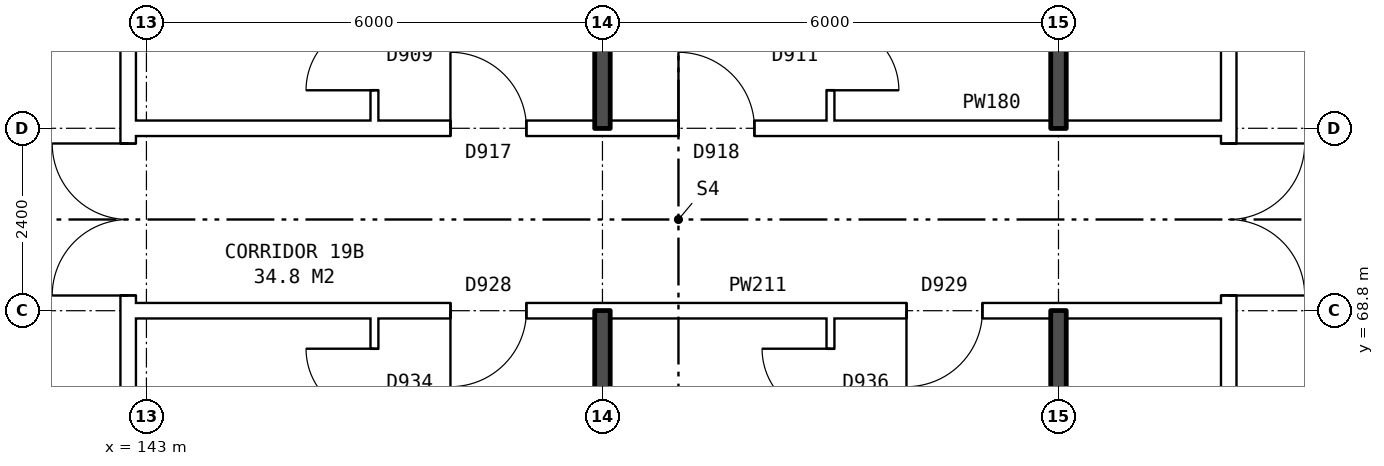
"""IFC4 building model, lengths in metres.
Left out: names, types, materials, properties, quantities, classifications, styles, units other than length and angle.
Written with IfcOpenShell. Run it as: python <this file> out.ifc"""

import sys

from ifc_helpers import new_model, si_unit, direction, frame, frame_2d, origin, place, context, subcontext, project, spatial, rectangle, extrude, element, fill, save


model = new_model("IFC4")
c1 = context("Model", 3, precision=1e-05, world=origin(), true_north=direction((0.0, 1.0)))
c2 = subcontext(c1, "Body", "Model", "MODEL_VIEW")
j1 = project(units=[si_unit("LENGTHUNIT", "METRE"), si_unit("PLANEANGLEUNIT", "RADIAN")], contexts=[c1])
p1 = place(None, origin())
s1 = spatial("IfcSite", under=j1, at=p1, CompositionType="ELEMENT")
p2 = place(p1, origin())
s2 = spatial("IfcBuilding", under=s1, at=p2, CompositionType="ELEMENT")
p3 = place(p2, frame((0.0, 0.0, 71.6)))
s3 = spatial("IfcBuildingStorey", under=s2, at=p3, CompositionType="ELEMENT", Elevation=71.6)
p4 = place(p3, frame((142.76, 63.9, 0.0), z_axis=(0.0, 0.0, 1.0), x_axis=(0.0, 1.0, 0.0)))
e1 = element("IfcWall", 1, at=p4, inside=s3, PredefinedType="PARTITIONING", context=c2, shape_type="SweptSolid", body=[
    extrude(rectangle(XDim=12.2, YDim=0.2, at=frame_2d((6.1, 0.0))), origin(), (0.0, 0.0, 1.0), 2.85),
])
p5 = place(p4, frame((5.1, 0.0, 0.0)))
e2 = element("IfcOpeningElement", 2, at=p5, cuts=e1, PredefinedType="OPENING", context=c2, shape_type="SweptSolid", body=[
    extrude(rectangle(XDim=2.0, YDim=2.1, at=frame_2d((1.0, 1.05))), frame((0.0, 0.11, 0.0), z_axis=(0.0, -1.0, 0.0), x_axis=(1.0, 0.0, 0.0)), (0.0, 0.0, 1.0), 0.22),
])
p6 = place(p3, frame((157.24, 63.9, 0.0), z_axis=(0.0, 0.0, 1.0), x_axis=(0.0, 1.0, 0.0)))
e3 = element("IfcWall", 3, at=p6, inside=s3, PredefinedType="PARTITIONING", context=c2, shape_type="SweptSolid", body=[
    extrude(rectangle(XDim=12.2, YDim=0.2, at=frame_2d((6.1, 0.0))), origin(), (0.0, 0.0, 1.0), 2.85),
])
p7 = place(p6, frame((5.1, 0.0, 0.0)))
e4 = element("IfcOpeningElement", 4, at=p7, cuts=e3, PredefinedType="OPENING", context=c2, shape_type="SweptSolid", body=[
    extrude(rectangle(XDim=2.0, YDim=2.1, at=frame_2d((1.0, 1.05))), frame((0.0, 0.11, 0.0), z_axis=(0.0, -1.0, 0.0), x_axis=(1.0, 0.0, 0.0)), (0.0, 0.0, 1.0), 0.22),
])
p8 = place(p3, frame((142.76, 68.8, 0.0), z_axis=(0.0, 0.0, 1.0), x_axis=(1.0, 0.0, 0.0)))
e5 = element("IfcWall", 5, at=p8, inside=s3, PredefinedType="PARTITIONING", context=c2, shape_type="SweptSolid", body=[
    extrude(rectangle(XDim=14.48, YDim=0.2, at=frame_2d((7.24, 0.0))), origin(), (0.0, 0.0, 1.0), 2.85),
])
p9 = place(p8, frame((4.24, 0.0, 0.0)))
e6 = element("IfcOpeningElement", 6, at=p9, cuts=e5, PredefinedType="OPENING", context=c2, shape_type="SweptSolid", body=[
    extrude(rectangle(XDim=1.0, YDim=2.1, at=frame_2d((0.5, 1.05))), frame((0.0, 0.11, 0.0), z_axis=(0.0, -1.0, 0.0), x_axis=(1.0, 0.0, 0.0)), (0.0, 0.0, 1.0), 0.22),
])
p10 = place(p8, frame((10.24, 0.0, 0.0)))
e7 = element("IfcOpeningElement", 7, at=p10, cuts=e5, PredefinedType="OPENING", context=c2, shape_type="SweptSolid", body=[
    extrude(rectangle(XDim=1.0, YDim=2.1, at=frame_2d((0.5, 1.05))), frame((0.0, 0.11, 0.0), z_axis=(0.0, -1.0, 0.0), x_axis=(1.0, 0.0, 0.0)), (0.0, 0.0, 1.0), 0.22),
])
p11 = place(p3, frame((142.76, 71.2, 0.0), z_axis=(0.0, 0.0, 1.0), x_axis=(1.0, 0.0, 0.0)))
e8 = element("IfcWall", 8, at=p11, inside=s3, PredefinedType="PARTITIONING", context=c2, shape_type="SweptSolid", body=[
    extrude(rectangle(XDim=14.48, YDim=0.2, at=frame_2d((7.24, 0.0))), origin(), (0.0, 0.0, 1.0), 2.85),
])
p12 = place(p11, frame((4.24, 0.0, 0.0)))
e9 = element("IfcOpeningElement", 9, at=p12, cuts=e8, PredefinedType="OPENING", context=c2, shape_type="SweptSolid", body=[
    extrude(rectangle(XDim=1.0, YDim=2.1, at=frame_2d((0.5, 1.05))), frame((0.0, 0.11, 0.0), z_axis=(0.0, -1.0, 0.0), x_axis=(1.0, 0.0, 0.0)), (0.0, 0.0, 1.0), 0.22),
])
p13 = place(p11, frame((7.24, 0.0, 0.0)))
e10 = element("IfcOpeningElement", 10, at=p13, cuts=e8, PredefinedType="OPENING", context=c2, shape_type="SweptSolid", body=[
    extrude(rectangle(XDim=1.0, YDim=2.1, at=frame_2d((0.5, 1.05))), frame((0.0, 0.11, 0.0), z_axis=(0.0, -1.0, 0.0), x_axis=(1.0, 0.0, 0.0)), (0.0, 0.0, 1.0), 0.22),
])
p14 = place(p3, frame((146.0, 54.36, 0.0), z_axis=(0.0, 0.0, 1.0), x_axis=(0.0, 1.0, 0.0)))
e11 = element("IfcWall", 11, at=p14, inside=s3, PredefinedType="PARTITIONING", context=c2, shape_type="SweptSolid", body=[
    extrude(rectangle(XDim=14.34, YDim=0.1, at=frame_2d((7.17, 0.0))), origin(), (0.0, 0.0, 1.0), 2.85),
])
p15 = place(p14, frame((4.2, 0.0, 0.0)))
e12 = element("IfcOpeningElement", 12, at=p15, cuts=e11, PredefinedType="OPENING", context=c2, shape_type="SweptSolid", body=[
    extrude(rectangle(XDim=0.9, YDim=2.1, at=frame_2d((0.45, 1.05))), frame((0.0, 0.06, 0.0), z_axis=(0.0, -1.0, 0.0), x_axis=(1.0, 0.0, 0.0)), (0.0, 0.0, 1.0), 0.12),
])
p16 = place(p14, frame((13.04, 0.0, 0.0)))
e13 = element("IfcOpeningElement", 13, at=p16, cuts=e11, PredefinedType="OPENING", context=c2, shape_type="SweptSolid", body=[
    extrude(rectangle(XDim=0.9, YDim=2.1, at=frame_2d((0.45, 1.05))), frame((0.0, 0.06, 0.0), z_axis=(0.0, -1.0, 0.0), x_axis=(1.0, 0.0, 0.0)), (0.0, 0.0, 1.0), 0.12),
])
p17 = place(p3, frame((146.0, 71.3, 0.0), z_axis=(0.0, 0.0, 1.0), x_axis=(0.0, 1.0, 0.0)))
e14 = element("IfcWall", 14, at=p17, inside=s3, PredefinedType="PARTITIONING", context=c2, shape_type="SweptSolid", body=[
    extrude(rectangle(XDim=14.34, YDim=0.1, at=frame_2d((7.17, 0.0))), origin(), (0.0, 0.0, 1.0), 2.85),
])
p18 = place(p17, frame((9.24, 0.0, 0.0)))
e15 = element("IfcOpeningElement", 15, at=p18, cuts=e14, PredefinedType="OPENING", context=c2, shape_type="SweptSolid", body=[
    extrude(rectangle(XDim=0.9, YDim=2.1, at=frame_2d((0.45, 1.05))), frame((0.0, 0.06, 0.0), z_axis=(0.0, -1.0, 0.0), x_axis=(1.0, 0.0, 0.0)), (0.0, 0.0, 1.0), 0.12),
])
p19 = place(p17, frame((0.4, 0.0, 0.0)))
e16 = element("IfcOpeningElement", 16, at=p19, cuts=e14, PredefinedType="OPENING", context=c2, shape_type="SweptSolid", body=[
    extrude(rectangle(XDim=0.9, YDim=2.1, at=frame_2d((0.45, 1.05))), frame((0.0, 0.06, 0.0), z_axis=(0.0, -1.0, 0.0), x_axis=(1.0, 0.0, 0.0)), (0.0, 0.0, 1.0), 0.12),
])
for number, where, z_axis, x_axis in (
    (17, (149.0, 54.36, 0.0), (0.0, 0.0, 1.0), (0.0, 1.0, 0.0)),
    (18, (149.0, 71.2, 0.0), (0.0, 0.0, 1.0), (0.0, 1.0, 0.0)),
):
    element("IfcWall", number, at=place(p3, frame(where, z_axis=z_axis, x_axis=x_axis)), inside=s3, PredefinedType="SOLIDWALL", context=c2, shape_type="SweptSolid", body=[
        extrude(rectangle(XDim=14.44, YDim=0.2, at=frame_2d((7.22, 0.0))), origin(), (0.0, 0.0, 1.0), 2.85),
    ])
p20 = place(p3, frame((152.0, 54.36, 0.0), z_axis=(0.0, 0.0, 1.0), x_axis=(0.0, 1.0, 0.0)))
e19 = element("IfcWall", 19, at=p20, inside=s3, PredefinedType="PARTITIONING", context=c2, shape_type="SweptSolid", body=[
    extrude(rectangle(XDim=14.34, YDim=0.1, at=frame_2d((7.17, 0.0))), origin(), (0.0, 0.0, 1.0), 2.85),
])
p21 = place(p20, frame((4.2, 0.0, 0.0)))
e20 = element("IfcOpeningElement", 20, at=p21, cuts=e19, PredefinedType="OPENING", context=c2, shape_type="SweptSolid", body=[
    extrude(rectangle(XDim=0.9, YDim=2.1, at=frame_2d((0.45, 1.05))), frame((0.0, 0.06, 0.0), z_axis=(0.0, -1.0, 0.0), x_axis=(1.0, 0.0, 0.0)), (0.0, 0.0, 1.0), 0.12),
])
p22 = place(p20, frame((13.04, 0.0, 0.0)))
e21 = element("IfcOpeningElement", 21, at=p22, cuts=e19, PredefinedType="OPENING", context=c2, shape_type="SweptSolid", body=[
    extrude(rectangle(XDim=0.9, YDim=2.1, at=frame_2d((0.45, 1.05))), frame((0.0, 0.06, 0.0), z_axis=(0.0, -1.0, 0.0), x_axis=(1.0, 0.0, 0.0)), (0.0, 0.0, 1.0), 0.12),
])
p23 = place(p3, frame((152.0, 71.3, 0.0), z_axis=(0.0, 0.0, 1.0), x_axis=(0.0, 1.0, 0.0)))
e22 = element("IfcWall", 22, at=p23, inside=s3, PredefinedType="PARTITIONING", context=c2, shape_type="SweptSolid", body=[
    extrude(rectangle(XDim=14.34, YDim=0.1, at=frame_2d((7.17, 0.0))), origin(), (0.0, 0.0, 1.0), 2.85),
])
p24 = place(p23, frame((7.94, 0.0, 0.0)))
e23 = element("IfcOpeningElement", 23, at=p24, cuts=e22, PredefinedType="OPENING", context=c2, shape_type="SweptSolid", body=[
    extrude(rectangle(XDim=0.9, YDim=2.1, at=frame_2d((0.45, 1.05))), frame((0.0, 0.06, 0.0), z_axis=(0.0, -1.0, 0.0), x_axis=(1.0, 0.0, 0.0)), (0.0, 0.0, 1.0), 0.12),
])
p25 = place(p23, frame((0.4, 0.0, 0.0)))
e24 = element("IfcOpeningElement", 24, at=p25, cuts=e22, PredefinedType="OPENING", context=c2, shape_type="SweptSolid", body=[
    extrude(rectangle(XDim=0.9, YDim=2.1, at=frame_2d((0.45, 1.05))), frame((0.0, 0.06, 0.0), z_axis=(0.0, -1.0, 0.0), x_axis=(1.0, 0.0, 0.0)), (0.0, 0.0, 1.0), 0.12),
])
for number, where, z_axis, x_axis in (
    (25, (155.0, 63.8, 0.0), (0.0, 0.0, 1.0), (0.0, 1.0, 0.0)),
    (26, (155.0, 71.2, 0.0), (0.0, 0.0, 1.0), (0.0, 1.0, 0.0)),
):
    element("IfcWall", number, at=place(p3, frame(where, z_axis=z_axis, x_axis=x_axis)), inside=s3, PredefinedType="SOLIDWALL", context=c2, shape_type="SweptSolid", body=[
        extrude(rectangle(XDim=5.0, YDim=0.2, at=frame_2d((2.5, 0.0))), origin(), (0.0, 0.0, 1.0), 2.85),
    ])
p26 = place(p5, origin())
e27 = element("IfcDoor", 27, at=p26, inside=s3, OperationType="DOUBLE_DOOR_SINGLE_SWING", PredefinedType="DOOR", context=c2, shape_type="SweptSolid", body=[
    extrude(rectangle(XDim=2.0, YDim=2.1, at=frame_2d((1.0, 1.05))), frame((0.0, 0.025, 0.0), z_axis=(0.0, -1.0, 0.0), x_axis=(1.0, 0.0, 0.0)), (0.0, 0.0, 1.0), 0.05),
])
fill(e2, e27)
p27 = place(p7, frame((2.0, 0.0, 0.0), z_axis=(0.0, 0.0, 1.0), x_axis=(-1.0, 0.0, 0.0)))
e28 = element("IfcDoor", 28, at=p27, inside=s3, OperationType="DOUBLE_DOOR_SINGLE_SWING", PredefinedType="DOOR", context=c2, shape_type="SweptSolid", body=[
    extrude(rectangle(XDim=2.0, YDim=2.1, at=frame_2d((1.0, 1.05))), frame((0.0, 0.025, 0.0), z_axis=(0.0, -1.0, 0.0), x_axis=(1.0, 0.0, 0.0)), (0.0, 0.0, 1.0), 0.05),
])
fill(e4, e28)
p28 = place(p9, frame((1.0, 0.0, 0.0), z_axis=(0.0, 0.0, 1.0), x_axis=(-1.0, 0.0, 0.0)))
e29 = element("IfcDoor", 29, at=p28, inside=s3, OperationType="SINGLE_SWING_RIGHT", PredefinedType="DOOR", context=c2, shape_type="SweptSolid", body=[
    extrude(rectangle(XDim=1.0, YDim=2.1, at=frame_2d((0.5, 1.05))), frame((0.0, 0.025, 0.0), z_axis=(0.0, -1.0, 0.0), x_axis=(1.0, 0.0, 0.0)), (0.0, 0.0, 1.0), 0.05),
])
fill(e6, e29)
p29 = place(p16, origin())
e30 = element("IfcDoor", 30, at=p29, inside=s3, OperationType="SINGLE_SWING_RIGHT", PredefinedType="DOOR", context=c2, shape_type="SweptSolid", body=[
    extrude(rectangle(XDim=0.9, YDim=2.1, at=frame_2d((0.45, 1.05))), frame((0.0, 0.025, 0.0), z_axis=(0.0, -1.0, 0.0), x_axis=(1.0, 0.0, 0.0)), (0.0, 0.0, 1.0), 0.05),
])
fill(e13, e30)
p30 = place(p10, frame((1.0, 0.0, 0.0), z_axis=(0.0, 0.0, 1.0), x_axis=(-1.0, 0.0, 0.0)))
e31 = element("IfcDoor", 31, at=p30, inside=s3, OperationType="SINGLE_SWING_RIGHT", PredefinedType="DOOR", context=c2, shape_type="SweptSolid", body=[
    extrude(rectangle(XDim=1.0, YDim=2.1, at=frame_2d((0.5, 1.05))), frame((0.0, 0.025, 0.0), z_axis=(0.0, -1.0, 0.0), x_axis=(1.0, 0.0, 0.0)), (0.0, 0.0, 1.0), 0.05),
])
fill(e7, e31)
p31 = place(p22, origin())
e32 = element("IfcDoor", 32, at=p31, inside=s3, OperationType="SINGLE_SWING_RIGHT", PredefinedType="DOOR", context=c2, shape_type="SweptSolid", body=[
    extrude(rectangle(XDim=0.9, YDim=2.1, at=frame_2d((0.45, 1.05))), frame((0.0, 0.025, 0.0), z_axis=(0.0, -1.0, 0.0), x_axis=(1.0, 0.0, 0.0)), (0.0, 0.0, 1.0), 0.05),
])
fill(e21, e32)
p32 = place(p12, origin())
e33 = element("IfcDoor", 33, at=p32, inside=s3, OperationType="SINGLE_SWING_LEFT", PredefinedType="DOOR", context=c2, shape_type="SweptSolid", body=[
    extrude(rectangle(XDim=1.0, YDim=2.1, at=frame_2d((0.5, 1.05))), frame((0.0, 0.025, 0.0), z_axis=(0.0, -1.0, 0.0), x_axis=(1.0, 0.0, 0.0)), (0.0, 0.0, 1.0), 0.05),
])
fill(e9, e33)
p33 = place(p19, origin())
e34 = element("IfcDoor", 34, at=p33, inside=s3, OperationType="SINGLE_SWING_LEFT", PredefinedType="DOOR", context=c2, shape_type="SweptSolid", body=[
    extrude(rectangle(XDim=0.9, YDim=2.1, at=frame_2d((0.45, 1.05))), frame((0.0, 0.025, 0.0), z_axis=(0.0, -1.0, 0.0), x_axis=(1.0, 0.0, 0.0)), (0.0, 0.0, 1.0), 0.05),
])
fill(e16, e34)
p34 = place(p13, origin())
e35 = element("IfcDoor", 35, at=p34, inside=s3, OperationType="SINGLE_SWING_LEFT", PredefinedType="DOOR", context=c2, shape_type="SweptSolid", body=[
    extrude(rectangle(XDim=1.0, YDim=2.1, at=frame_2d((0.5, 1.05))), frame((0.0, 0.025, 0.0), z_axis=(0.0, -1.0, 0.0), x_axis=(1.0, 0.0, 0.0)), (0.0, 0.0, 1.0), 0.05),
])
fill(e10, e35)
p35 = place(p25, frame((0.9, 0.0, 0.0), z_axis=(0.0, 0.0, 1.0), x_axis=(-1.0, 0.0, 0.0)))
e36 = element("IfcDoor", 36, at=p35, inside=s3, OperationType="SINGLE_SWING_RIGHT", PredefinedType="DOOR", context=c2, shape_type="SweptSolid", body=[
    extrude(rectangle(XDim=0.9, YDim=2.1, at=frame_2d((0.45, 1.05))), frame((0.0, 0.025, 0.0), z_axis=(0.0, -1.0, 0.0), x_axis=(1.0, 0.0, 0.0)), (0.0, 0.0, 1.0), 0.05),
])
fill(e24, e36)
save(model, sys.argv[1])
